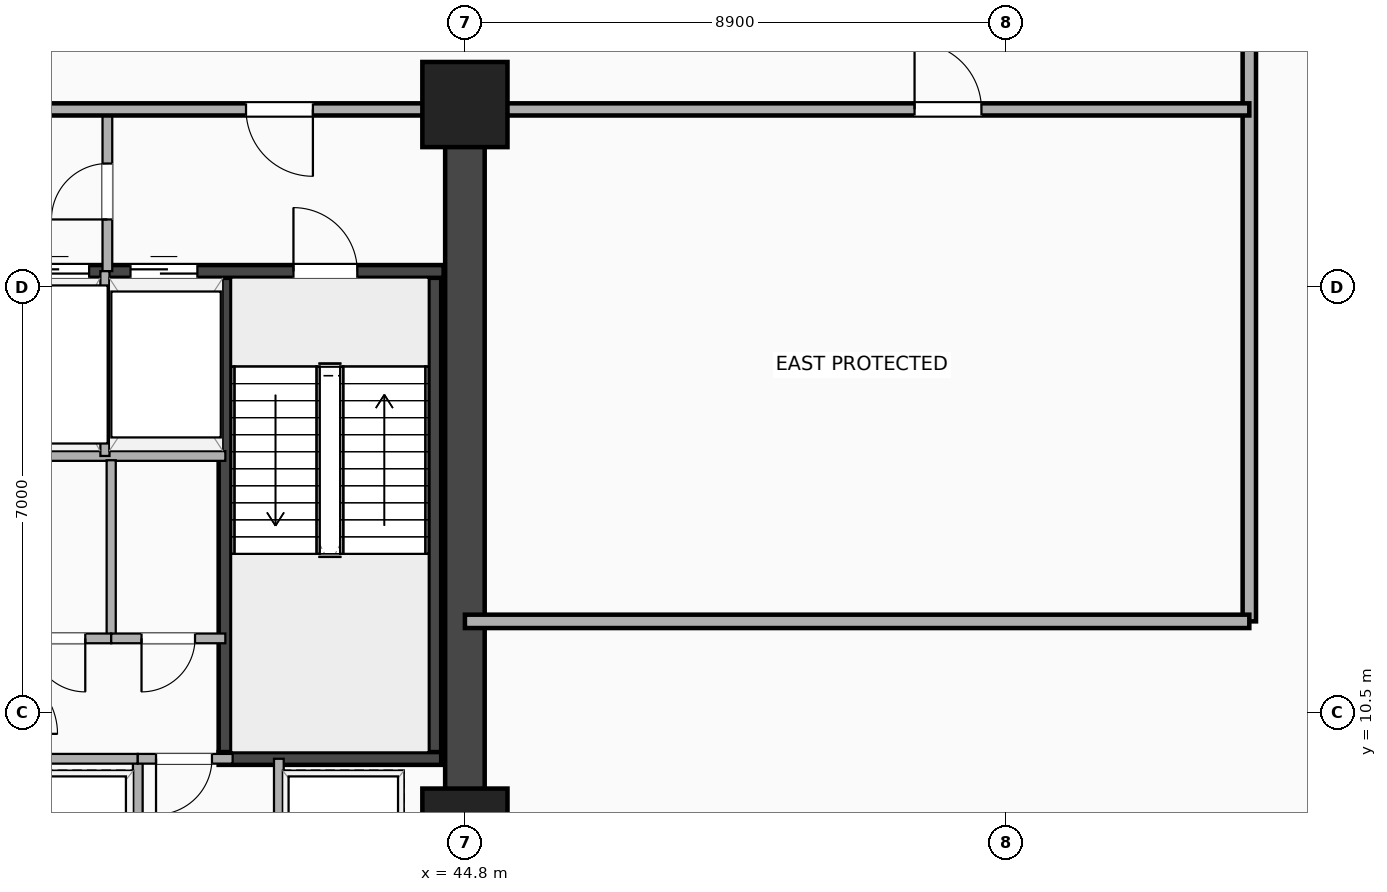
"""IFC4 building model, lengths in metres.
Left out: names, types, materials, properties, quantities, classifications, styles, units other than length and angle.
Written with IfcOpenShell. Run it as: python <this file> out.ifc"""

import sys

from ifc_helpers import new_model, si_unit, direction, frame, frame_2d, origin, origin_2d, place, context, subcontext, project, spatial, rectangle, extrude, element, fill, save


model = new_model("IFC4")
c1 = context("Model", 3, precision=1e-05, world=origin(), true_north=direction((0.0, 1.0)))
c2 = subcontext(c1, "Body", "Model", "MODEL_VIEW")
j1 = project(units=[si_unit("LENGTHUNIT", "METRE"), si_unit("PLANEANGLEUNIT", "RADIAN")], contexts=[c1])
p1 = place(None, origin())
s1 = spatial("IfcSite", under=j1, at=p1, CompositionType="ELEMENT")
p2 = place(p1, origin())
s2 = spatial("IfcBuilding", under=s1, at=p2, CompositionType="ELEMENT")
p3 = place(p2, frame((0.0, 0.0, 75.4)))
s3 = spatial("IfcBuildingStorey", under=s2, at=p3, CompositionType="ELEMENT", Elevation=75.4)
p4 = place(p3, frame((44.8, 3.5, 0.0), z_axis=(0.0, 0.0, 1.0), x_axis=(0.0, 1.0, 0.0)))
e1 = element("IfcWall", 1, at=p4, inside=s3, PredefinedType="SHEAR", context=c2, shape_type="SweptSolid", body=[
    extrude(rectangle(XDim=16.9, YDim=0.65, at=frame_2d((8.45, 0.0))), origin(), (0.0, 0.0, 1.0), 8.14),
])
for number, where, z_axis, x_axis in (
    (2, (40.855, 9.745, 0.0), (0.0, 0.0, 1.0), (0.0, 1.0, 0.0)),
    (3, (44.305, 9.745, 0.0), (0.0, 0.0, 1.0), (0.0, 1.0, 0.0)),
):
    element("IfcWall", number, at=place(p3, frame(where, z_axis=z_axis, x_axis=x_axis)), inside=s3, PredefinedType="SHEAR", context=c2, shape_type="SweptSolid", body=[
        extrude(rectangle(XDim=8.01, YDim=0.21, at=frame_2d((4.005, 0.0))), origin(), (0.0, 0.0, 1.0), 8.14),
    ])
p5 = place(p3, frame((40.75, 9.745, 0.0), z_axis=(0.0, 0.0, 1.0), x_axis=(1.0, 0.0, 0.0)))
e4 = element("IfcWall", 4, at=p5, inside=s3, PredefinedType="SHEAR", context=c2, shape_type="SweptSolid", body=[
    extrude(rectangle(XDim=3.66, YDim=0.21, at=frame_2d((1.83, 0.0))), origin(), (0.0, 0.0, 1.0), 8.14),
])
p6 = place(p3, frame((37.25, 17.755, 0.0), z_axis=(0.0, 0.0, 1.0), x_axis=(1.0, 0.0, 0.0)))
e5 = element("IfcWall", 5, at=p6, inside=s3, PredefinedType="SHEAR", context=c2, shape_type="SweptSolid", body=[
    extrude(rectangle(XDim=7.2, YDim=0.21, at=frame_2d((3.6, 0.0))), origin(), (0.0, 0.0, 1.0), 8.14),
])
p7 = place(p6, frame((0.25, 0.0, 0.0)))
e6 = element("IfcOpeningElement", 6, at=p7, cuts=e5, PredefinedType="OPENING", context=c2, shape_type="SweptSolid", body=[
    extrude(rectangle(XDim=1.12, YDim=2.2, at=frame_2d((0.56, 1.1))), frame((0.0, 0.115, 0.0), z_axis=(0.0, -1.0, 0.0), x_axis=(1.0, 0.0, 0.0)), (0.0, 0.0, 1.0), 0.23),
])
p8 = place(p6, frame((2.05, 0.0, 0.0)))
e7 = element("IfcOpeningElement", 7, at=p8, cuts=e5, PredefinedType="OPENING", context=c2, shape_type="SweptSolid", body=[
    extrude(rectangle(XDim=1.1, YDim=2.18, at=frame_2d((0.55, 1.09))), frame((0.0, 0.115, 0.0), z_axis=(0.0, -1.0, 0.0), x_axis=(1.0, 0.0, 0.0)), (0.0, 0.0, 1.0), 0.23),
])
p9 = place(p6, frame((5.78, 0.0, 0.0), z_axis=(0.0, 0.0, 1.0), x_axis=(-1.0, 0.0, 0.0)))
e8 = element("IfcOpeningElement", 8, at=p9, cuts=e5, PredefinedType="OPENING", context=c2, shape_type="SweptSolid", body=[
    extrude(rectangle(XDim=1.05, YDim=2.15, at=frame_2d((0.525, 1.075))), frame((0.0, 0.115, 0.0), z_axis=(0.0, -1.0, 0.0), x_axis=(1.0, 0.0, 0.0)), (0.0, 0.0, 1.0), 0.23),
])
for number, where, z_axis, x_axis in (
    (9, (44.8, 8.55, -0.32), (0.0, 0.0, 1.0), (1.0, 0.0, 0.0)),
    (10, (44.8, 20.5, -0.32), (0.0, 0.0, 1.0), (1.0, 0.0, 0.0)),
):
    element("IfcColumn", number, at=place(p3, frame(where, z_axis=z_axis, x_axis=x_axis)), inside=s3, PredefinedType="COLUMN", context=c2, shape_type="SweptSolid", body=[
        extrude(rectangle(XDim=1.4, YDim=1.4, at=origin_2d()), origin(), (0.0, 0.0, 1.0), 8.46),
    ])
p10 = place(p3, frame((38.92, 17.76, 0.0), z_axis=(0.0, 0.0, 1.0), x_axis=(0.0, 1.0, 0.0)))
e11 = element("IfcWall", 11, at=p10, inside=s3, PredefinedType="PARTITIONING", context=c2, shape_type="SweptSolid", body=[
    extrude(rectangle(XDim=2.66, YDim=0.16, at=frame_2d((1.33, 0.0))), origin(), (0.0, 0.0, 1.0), 7.43),
])
p11 = place(p10, frame((1.77, 0.0, 0.0), z_axis=(0.0, 0.0, 1.0), x_axis=(-1.0, 0.0, 0.0)))
e12 = element("IfcOpeningElement", 12, at=p11, cuts=e11, PredefinedType="OPENING", context=c2, shape_type="SweptSolid", body=[
    extrude(rectangle(XDim=0.92, YDim=2.08, at=frame_2d((0.46, 1.04))), frame((0.0, 0.09, 0.0), z_axis=(0.0, -1.0, 0.0), x_axis=(1.0, 0.0, 0.0)), (0.0, 0.0, 1.0), 0.18),
])
p12 = place(p3, frame((37.25, 14.72, 0.0), z_axis=(0.0, 0.0, 1.0), x_axis=(1.0, 0.0, 0.0)))
e13 = element("IfcWall", 13, at=p12, inside=s3, PredefinedType="PARTITIONING", context=c2, shape_type="SweptSolid", body=[
    extrude(rectangle(XDim=3.61, YDim=0.16, at=frame_2d((1.805, 0.0))), origin(), (0.0, 0.0, 1.0), 8.14),
])
p13 = place(p3, frame((38.88, 14.72, 0.0), z_axis=(0.0, 0.0, 1.0), x_axis=(0.0, 1.0, 0.0)))
e14 = element("IfcWall", 14, at=p13, inside=s3, PredefinedType="PARTITIONING", context=c2, shape_type="SweptSolid", body=[
    extrude(rectangle(XDim=3.04, YDim=0.15, at=frame_2d((1.52, 0.0))), origin(), (0.0, 0.0, 1.0), 8.14),
])
p14 = place(p3, frame((37.0, 20.42, 0.0), z_axis=(0.0, 0.0, 1.0), x_axis=(1.0, 0.0, 0.0)))
e15 = element("IfcWall", 15, at=p14, inside=s3, PredefinedType="PARTITIONING", context=c2, shape_type="SweptSolid", body=[
    extrude(rectangle(XDim=7.45, YDim=0.2, at=frame_2d((3.725, 0.0))), origin(), (0.0, 0.0, 1.0), 6.445),
])
p15 = place(p14, frame((4.2, 0.0, 0.0)))
e16 = element("IfcOpeningElement", 16, at=p15, cuts=e15, PredefinedType="OPENING", context=c2, shape_type="SweptSolid", body=[
    extrude(rectangle(XDim=1.1, YDim=2.15, at=frame_2d((0.55, 1.075))), frame((0.0, 0.11, 0.0), z_axis=(0.0, -1.0, 0.0), x_axis=(1.0, 0.0, 0.0)), (0.0, 0.0, 1.0), 0.22),
])
p16 = place(p3, frame((38.983, 11.72, 0.0), z_axis=(0.0, 0.0, 1.0), x_axis=(0.0, 1.0, 0.0)))
e17 = element("IfcWall", 17, at=p16, inside=s3, PredefinedType="PARTITIONING", context=c2, shape_type="SweptSolid", body=[
    extrude(rectangle(XDim=2.93, YDim=0.15, at=frame_2d((1.465, 0.0))), origin(), (0.0, 0.0, 1.0), 8.14),
])
p17 = place(p3, frame((37.25, 11.72, 0.0), z_axis=(0.0, 0.0, 1.0), x_axis=(1.0, 0.0, 0.0)))
e18 = element("IfcWall", 18, at=p17, inside=s3, PredefinedType="PARTITIONING", context=c2, shape_type="SweptSolid", body=[
    extrude(rectangle(XDim=1.733, YDim=0.16, at=frame_2d((0.866, 0.0))), origin(), (0.0, 0.0, 1.0), 8.14),
])
p18 = place(p17, frame((0.427, 0.0, 0.0)))
e19 = element("IfcOpeningElement", 19, at=p18, cuts=e18, PredefinedType="OPENING", context=c2, shape_type="SweptSolid", body=[
    extrude(rectangle(XDim=0.88, YDim=2.08, at=frame_2d((0.44, 1.04))), frame((0.0, 0.09, 0.0), z_axis=(0.0, -1.0, 0.0), x_axis=(1.0, 0.0, 0.0)), (0.0, 0.0, 1.0), 0.18),
])
p19 = place(p3, frame((38.983, 11.72, 0.0), z_axis=(0.0, 0.0, 1.0), x_axis=(1.0, 0.0, 0.0)))
e20 = element("IfcWall", 20, at=p19, inside=s3, PredefinedType="PARTITIONING", context=c2, shape_type="SweptSolid", body=[
    extrude(rectangle(XDim=1.877, YDim=0.16, at=frame_2d((0.938, 0.0))), origin(), (0.0, 0.0, 1.0), 8.14),
])
p20 = place(p19, frame((0.499, 0.0, 0.0)))
e21 = element("IfcOpeningElement", 21, at=p20, cuts=e20, PredefinedType="OPENING", context=c2, shape_type="SweptSolid", body=[
    extrude(rectangle(XDim=0.88, YDim=2.08, at=frame_2d((0.44, 1.04))), frame((0.0, 0.09, 0.0), z_axis=(0.0, -1.0, 0.0), x_axis=(1.0, 0.0, 0.0)), (0.0, 0.0, 1.0), 0.18),
])
for number, where, z_axis, x_axis in (
    (22, (39.42, 3.9, 0.0), (0.0, 0.0, 1.0), (0.0, 1.0, 0.0)),
    (23, (41.74, 3.9, 0.0), (0.0, 0.0, 1.0), (0.0, 1.0, 0.0)),
):
    element("IfcWall", number, at=place(p3, frame(where, z_axis=z_axis, x_axis=x_axis)), inside=s3, PredefinedType="PARTITIONING", context=c2, shape_type="SweptSolid", body=[
        extrude(rectangle(XDim=5.84, YDim=0.16, at=frame_2d((2.92, 0.0))), origin(), (0.0, 0.0, 1.0), 8.14),
    ])
p21 = place(p3, frame((37.25, 9.74, 0.0), z_axis=(0.0, 0.0, 1.0), x_axis=(1.0, 0.0, 0.0)))
e24 = element("IfcWall", 24, at=p21, inside=s3, PredefinedType="PARTITIONING", context=c2, shape_type="SweptSolid", body=[
    extrude(rectangle(XDim=2.17, YDim=0.16, at=frame_2d((1.085, 0.0))), origin(), (0.0, 0.0, 1.0), 8.14),
])
p22 = place(p3, frame((39.42, 9.74, 0.0), z_axis=(0.0, 0.0, 1.0), x_axis=(1.0, 0.0, 0.0)))
e25 = element("IfcWall", 25, at=p22, inside=s3, PredefinedType="PARTITIONING", context=c2, shape_type="SweptSolid", body=[
    extrude(rectangle(XDim=1.56, YDim=0.16, at=frame_2d((0.78, 0.0))), origin(), (0.0, 0.0, 1.0), 8.14),
])
p23 = place(p22, frame((0.3, 0.0, 0.0)))
e26 = element("IfcOpeningElement", 26, at=p23, cuts=e25, PredefinedType="OPENING", context=c2, shape_type="SweptSolid", body=[
    extrude(rectangle(XDim=0.92, YDim=2.08, at=frame_2d((0.46, 1.04))), frame((0.0, 0.09, 0.0), z_axis=(0.0, -1.0, 0.0), x_axis=(1.0, 0.0, 0.0)), (0.0, 0.0, 1.0), 0.18),
])
p24 = place(p3, frame((57.7, 12.0, 0.0), z_axis=(0.0, 0.0, 1.0), x_axis=(0.0, 1.0, 0.0)))
e27 = element("IfcWall", 27, at=p24, inside=s3, PredefinedType="PARTITIONING", context=c2, shape_type="SweptSolid", body=[
    extrude(rectangle(XDim=20.8, YDim=0.22, at=frame_2d((10.4, 0.0))), origin(), (0.0, 0.0, 1.0), 6.445),
])
p25 = place(p3, frame((44.8, 12.0, 0.0), z_axis=(0.0, 0.0, 1.0), x_axis=(1.0, 0.0, 0.0)))
e28 = element("IfcWall", 28, at=p25, inside=s3, PredefinedType="PARTITIONING", context=c2, shape_type="SweptSolid", body=[
    extrude(rectangle(XDim=12.9, YDim=0.22, at=frame_2d((6.45, 0.0))), origin(), (0.0, 0.0, 1.0), 6.445),
])
p26 = place(p3, frame((44.8, 20.42, 0.0), z_axis=(0.0, 0.0, 1.0), x_axis=(1.0, 0.0, 0.0)))
e29 = element("IfcWall", 29, at=p26, inside=s3, PredefinedType="PARTITIONING", context=c2, shape_type="SweptSolid", body=[
    extrude(rectangle(XDim=12.9, YDim=0.2, at=frame_2d((6.45, 0.0))), origin(), (0.0, 0.0, 1.0), 6.445),
])
p27 = place(p26, frame((8.495, 0.0, 0.0), z_axis=(0.0, 0.0, 1.0), x_axis=(-1.0, 0.0, 0.0)))
e30 = element("IfcOpeningElement", 30, at=p27, cuts=e29, PredefinedType="OPENING", context=c2, shape_type="SweptSolid", body=[
    extrude(rectangle(XDim=1.1, YDim=2.15, at=frame_2d((0.55, 1.075))), frame((0.0, 0.11, 0.0), z_axis=(0.0, -1.0, 0.0), x_axis=(1.0, 0.0, 0.0)), (0.0, 0.0, 1.0), 0.22),
])
p28 = place(p7, origin())
e31 = element("IfcDoor", 31, at=p28, inside=s3, OperationType="DOUBLE_DOOR_SLIDING", PredefinedType="DOOR", context=c2, shape_type="SweptSolid", body=[
    extrude(rectangle(XDim=1.12, YDim=2.2, at=frame_2d((0.56, 1.1))), frame((0.0, 0.025, 0.0), z_axis=(0.0, -1.0, 0.0), x_axis=(1.0, 0.0, 0.0)), (0.0, 0.0, 1.0), 0.05),
])
fill(e6, e31)
p29 = place(p8, origin())
e32 = element("IfcDoor", 32, at=p29, inside=s3, OperationType="DOUBLE_DOOR_SLIDING", PredefinedType="DOOR", context=c2, shape_type="SweptSolid", body=[
    extrude(rectangle(XDim=1.1, YDim=2.18, at=frame_2d((0.55, 1.09))), frame((0.0, 0.025, 0.0), z_axis=(0.0, -1.0, 0.0), x_axis=(1.0, 0.0, 0.0)), (0.0, 0.0, 1.0), 0.05),
])
fill(e7, e32)
p30 = place(p9, origin())
e33 = element("IfcDoor", 33, at=p30, inside=s3, OperationType="SINGLE_SWING_LEFT", PredefinedType="DOOR", context=c2, shape_type="SweptSolid", body=[
    extrude(rectangle(XDim=1.05, YDim=2.15, at=frame_2d((0.525, 1.075))), frame((0.0, 0.025, 0.0), z_axis=(0.0, -1.0, 0.0), x_axis=(1.0, 0.0, 0.0)), (0.0, 0.0, 1.0), 0.05),
])
fill(e8, e33)
p31 = place(p11, origin())
e34 = element("IfcDoor", 34, at=p31, inside=s3, OperationType="SINGLE_SWING_LEFT", PredefinedType="DOOR", context=c2, shape_type="SweptSolid", body=[
    extrude(rectangle(XDim=0.92, YDim=2.08, at=frame_2d((0.46, 1.04))), frame((0.0, 0.025, 0.0), z_axis=(0.0, -1.0, 0.0), x_axis=(1.0, 0.0, 0.0)), (0.0, 0.0, 1.0), 0.05),
])
fill(e12, e34)
p32 = place(p15, origin())
e35 = element("IfcDoor", 35, at=p32, inside=s3, OperationType="SINGLE_SWING_RIGHT", PredefinedType="DOOR", context=c2, shape_type="SweptSolid", body=[
    extrude(rectangle(XDim=1.1, YDim=2.15, at=frame_2d((0.55, 1.075))), frame((0.0, 0.025, 0.0), z_axis=(0.0, -1.0, 0.0), x_axis=(1.0, 0.0, 0.0)), (0.0, 0.0, 1.0), 0.05),
])
fill(e16, e35)
p33 = place(p18, origin())
e36 = element("IfcDoor", 36, at=p33, inside=s3, OperationType="SINGLE_SWING_RIGHT", PredefinedType="DOOR", context=c2, shape_type="SweptSolid", body=[
    extrude(rectangle(XDim=0.88, YDim=2.08, at=frame_2d((0.44, 1.04))), frame((0.0, 0.025, 0.0), z_axis=(0.0, -1.0, 0.0), x_axis=(1.0, 0.0, 0.0)), (0.0, 0.0, 1.0), 0.05),
])
fill(e19, e36)
p34 = place(p20, origin())
e37 = element("IfcDoor", 37, at=p34, inside=s3, OperationType="SINGLE_SWING_LEFT", PredefinedType="DOOR", context=c2, shape_type="SweptSolid", body=[
    extrude(rectangle(XDim=0.88, YDim=2.08, at=frame_2d((0.44, 1.04))), frame((0.0, 0.025, 0.0), z_axis=(0.0, -1.0, 0.0), x_axis=(1.0, 0.0, 0.0)), (0.0, 0.0, 1.0), 0.05),
])
fill(e21, e37)
p35 = place(p23, origin())
e38 = element("IfcDoor", 38, at=p35, inside=s3, OperationType="SINGLE_SWING_LEFT", PredefinedType="DOOR", context=c2, shape_type="SweptSolid", body=[
    extrude(rectangle(XDim=0.92, YDim=2.08, at=frame_2d((0.46, 1.04))), frame((0.0, 0.025, 0.0), z_axis=(0.0, -1.0, 0.0), x_axis=(1.0, 0.0, 0.0)), (0.0, 0.0, 1.0), 0.05),
])
fill(e26, e38)
p36 = place(p27, origin())
e39 = element("IfcDoor", 39, at=p36, inside=s3, OperationType="SINGLE_SWING_LEFT", PredefinedType="DOOR", context=c2, shape_type="SweptSolid", body=[
    extrude(rectangle(XDim=1.1, YDim=2.15, at=frame_2d((0.55, 1.075))), frame((0.0, 0.025, 0.0), z_axis=(0.0, -1.0, 0.0), x_axis=(1.0, 0.0, 0.0)), (0.0, 0.0, 1.0), 0.05),
])
fill(e30, e39)
save(model, sys.argv[1])
